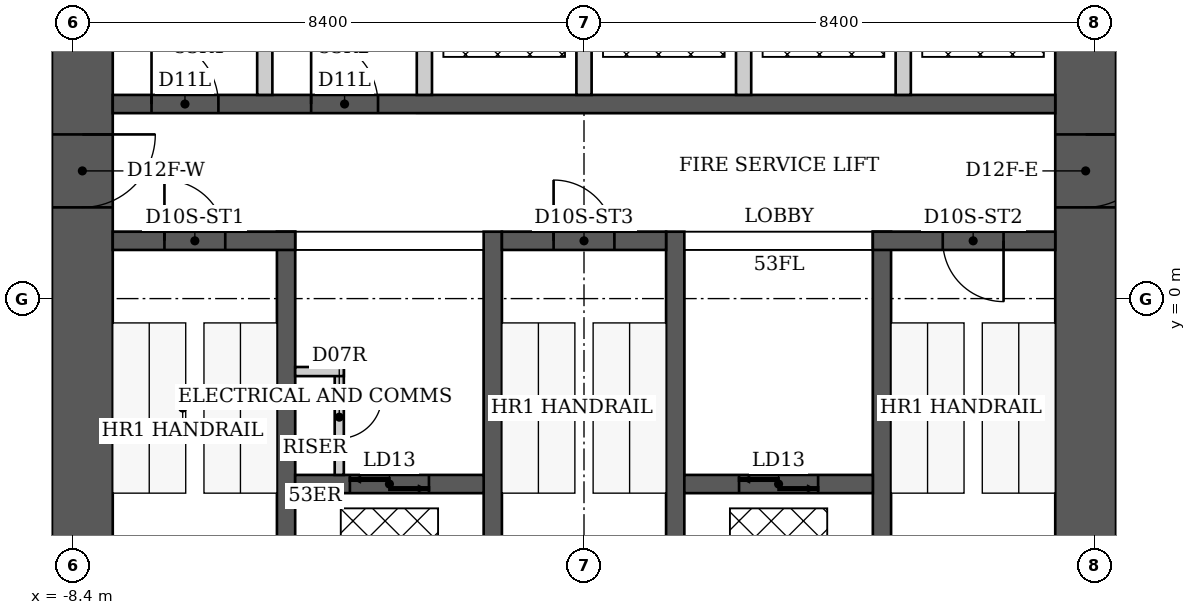
"""IFC4 building model, lengths in metres.
Left out: names, types, materials, properties, quantities, classifications, styles, units other than length and angle.
Written with IfcOpenShell. Run it as: python <this file> out.ifc"""

import sys

from ifc_helpers import new_model, si_unit, direction, frame, frame_2d, origin, place, context, subcontext, project, spatial, rectangle, extrude, element, fill, save


model = new_model("IFC4")
c1 = context("Model", 3, precision=1e-05, world=origin(), true_north=direction((0.0, 1.0)))
c2 = subcontext(c1, "Body", "Model", "MODEL_VIEW")
j1 = project(units=[si_unit("LENGTHUNIT", "METRE"), si_unit("PLANEANGLEUNIT", "RADIAN")], contexts=[c1])
p1 = place(None, origin())
s1 = spatial("IfcSite", under=j1, at=p1, CompositionType="ELEMENT")
p2 = place(p1, origin())
s2 = spatial("IfcBuilding", under=s1, at=p2, CompositionType="ELEMENT")
p3 = place(p2, frame((0.0, 0.0, 213.6)))
s3 = spatial("IfcBuildingStorey", under=s2, at=p3, CompositionType="ELEMENT", Elevation=213.6)
p4 = place(p3, frame((-8.25, -6.1, 0.0), z_axis=(0.0, 0.0, 1.0), x_axis=(0.0, 1.0, 0.0)))
e1 = element("IfcWall", 1, at=p4, inside=s3, PredefinedType="SHEAR", context=c2, shape_type="SweptSolid", body=[
    extrude(rectangle(XDim=12.2, YDim=1.0, at=frame_2d((6.1, 0.0))), origin(), (0.0, 0.0, 1.0), 3.8),
])
p5 = place(p4, frame((7.6, 0.0, 0.0)))
e2 = element("IfcOpeningElement", 2, at=p5, cuts=e1, PredefinedType="OPENING", context=c2, shape_type="SweptSolid", body=[
    extrude(rectangle(XDim=1.2, YDim=2.2, at=frame_2d((0.6, 1.1))), frame((0.0, 0.5, 0.0), z_axis=(0.0, -1.0, 0.0), x_axis=(1.0, 0.0, 0.0)), (0.0, 0.0, 1.0), 1.0),
])
p6 = place(p3, frame((8.25, -6.1, 0.0), z_axis=(0.0, 0.0, 1.0), x_axis=(0.0, 1.0, 0.0)))
e3 = element("IfcWall", 3, at=p6, inside=s3, PredefinedType="SHEAR", context=c2, shape_type="SweptSolid", body=[
    extrude(rectangle(XDim=12.2, YDim=1.0, at=frame_2d((6.1, 0.0))), origin(), (0.0, 0.0, 1.0), 3.8),
])
p7 = place(p6, frame((7.6, 0.0, 0.0)))
e4 = element("IfcOpeningElement", 4, at=p7, cuts=e3, PredefinedType="OPENING", context=c2, shape_type="SweptSolid", body=[
    extrude(rectangle(XDim=1.2, YDim=2.2, at=frame_2d((0.6, 1.1))), frame((0.0, 0.5, 0.0), z_axis=(0.0, -1.0, 0.0), x_axis=(1.0, 0.0, 0.0)), (0.0, 0.0, 1.0), 1.0),
])
for number, where, z_axis, x_axis in (
    (5, (-4.9, -6.1, 0.0), (0.0, 0.0, 1.0), (0.0, 1.0, 0.0)),
    (6, (-1.5, -6.1, 0.0), (0.0, 0.0, 1.0), (0.0, 1.0, 0.0)),
    (7, (1.5, -6.1, 0.0), (0.0, 0.0, 1.0), (0.0, 1.0, 0.0)),
    (8, (4.9, -6.1, 0.0), (0.0, 0.0, 1.0), (0.0, 1.0, 0.0)),
):
    element("IfcWall", number, at=place(p3, frame(where, z_axis=z_axis, x_axis=x_axis)), inside=s3, PredefinedType="SHEAR", context=c2, shape_type="SweptSolid", body=[
        extrude(rectangle(XDim=7.2, YDim=0.3, at=frame_2d((3.6, 0.0))), origin(), (0.0, 0.0, 1.0), 3.8),
    ])
p8 = place(p3, frame((-7.75, 0.95, 0.0), z_axis=(0.0, 0.0, 1.0), x_axis=(1.0, 0.0, 0.0)))
e9 = element("IfcWall", 9, at=p8, inside=s3, PredefinedType="SHEAR", context=c2, shape_type="SweptSolid", body=[
    extrude(rectangle(XDim=3.0, YDim=0.3, at=frame_2d((1.5, 0.0))), origin(), (0.0, 0.0, 1.0), 3.8),
])
p9 = place(p8, frame((0.85, 0.0, 0.0)))
e10 = element("IfcOpeningElement", 10, at=p9, cuts=e9, PredefinedType="OPENING", context=c2, shape_type="SweptSolid", body=[
    extrude(rectangle(XDim=1.0, YDim=2.2, at=frame_2d((0.5, 1.1))), frame((0.0, 0.15, 0.0), z_axis=(0.0, -1.0, 0.0), x_axis=(1.0, 0.0, 0.0)), (0.0, 0.0, 1.0), 0.3),
])
p10 = place(p3, frame((-1.35, 0.95, 0.0), z_axis=(0.0, 0.0, 1.0), x_axis=(1.0, 0.0, 0.0)))
e11 = element("IfcWall", 11, at=p10, inside=s3, PredefinedType="SHEAR", context=c2, shape_type="SweptSolid", body=[
    extrude(rectangle(XDim=2.7, YDim=0.3, at=frame_2d((1.35, 0.0))), origin(), (0.0, 0.0, 1.0), 3.8),
])
p11 = place(p10, frame((0.85, 0.0, 0.0)))
e12 = element("IfcOpeningElement", 12, at=p11, cuts=e11, PredefinedType="OPENING", context=c2, shape_type="SweptSolid", body=[
    extrude(rectangle(XDim=1.0, YDim=2.2, at=frame_2d((0.5, 1.1))), frame((0.0, 0.15, 0.0), z_axis=(0.0, -1.0, 0.0), x_axis=(1.0, 0.0, 0.0)), (0.0, 0.0, 1.0), 0.3),
])
p12 = place(p3, frame((4.75, 0.95, 0.0), z_axis=(0.0, 0.0, 1.0), x_axis=(1.0, 0.0, 0.0)))
e13 = element("IfcWall", 13, at=p12, inside=s3, PredefinedType="SHEAR", context=c2, shape_type="SweptSolid", body=[
    extrude(rectangle(XDim=3.0, YDim=0.3, at=frame_2d((1.5, 0.0))), origin(), (0.0, 0.0, 1.0), 3.8),
])
p13 = place(p12, frame((1.15, 0.0, 0.0)))
e14 = element("IfcOpeningElement", 14, at=p13, cuts=e13, PredefinedType="OPENING", context=c2, shape_type="SweptSolid", body=[
    extrude(rectangle(XDim=1.0, YDim=2.2, at=frame_2d((0.5, 1.1))), frame((0.0, 0.15, 0.0), z_axis=(0.0, -1.0, 0.0), x_axis=(1.0, 0.0, 0.0)), (0.0, 0.0, 1.0), 0.3),
])
p14 = place(p3, frame((-4.75, -3.05, 0.0), z_axis=(0.0, 0.0, 1.0), x_axis=(1.0, 0.0, 0.0)))
e15 = element("IfcWall", 15, at=p14, inside=s3, PredefinedType="SHEAR", context=c2, shape_type="SweptSolid", body=[
    extrude(rectangle(XDim=3.1, YDim=0.3, at=frame_2d((1.55, 0.0))), origin(), (0.0, 0.0, 1.0), 3.8),
])
p15 = place(p14, frame((0.9, 0.0, 0.0)))
e16 = element("IfcOpeningElement", 16, at=p15, cuts=e15, PredefinedType="OPENING", context=c2, shape_type="SweptSolid", body=[
    extrude(rectangle(XDim=1.3, YDim=2.1, at=frame_2d((0.65, 1.05))), frame((0.0, 0.15, 0.0), z_axis=(0.0, -1.0, 0.0), x_axis=(1.0, 0.0, 0.0)), (0.0, 0.0, 1.0), 0.3),
])
p16 = place(p3, frame((1.65, -3.05, 0.0), z_axis=(0.0, 0.0, 1.0), x_axis=(1.0, 0.0, 0.0)))
e17 = element("IfcWall", 17, at=p16, inside=s3, PredefinedType="SHEAR", context=c2, shape_type="SweptSolid", body=[
    extrude(rectangle(XDim=3.1, YDim=0.3, at=frame_2d((1.55, 0.0))), origin(), (0.0, 0.0, 1.0), 3.8),
])
p17 = place(p16, frame((0.9, 0.0, 0.0)))
e18 = element("IfcOpeningElement", 18, at=p17, cuts=e17, PredefinedType="OPENING", context=c2, shape_type="SweptSolid", body=[
    extrude(rectangle(XDim=1.3, YDim=2.1, at=frame_2d((0.65, 1.05))), frame((0.0, 0.15, 0.0), z_axis=(0.0, -1.0, 0.0), x_axis=(1.0, 0.0, 0.0)), (0.0, 0.0, 1.0), 0.3),
])
p18 = place(p3, frame((-7.75, 3.2, 0.0), z_axis=(0.0, 0.0, 1.0), x_axis=(1.0, 0.0, 0.0)))
e19 = element("IfcWall", 19, at=p18, inside=s3, PredefinedType="SHEAR", context=c2, shape_type="SweptSolid", body=[
    extrude(rectangle(XDim=15.5, YDim=0.3, at=frame_2d((7.75, 0.0))), origin(), (0.0, 0.0, 1.0), 3.8),
])
p19 = place(p18, frame((0.637, 0.0, 0.0)))
e20 = element("IfcOpeningElement", 20, at=p19, cuts=e19, PredefinedType="OPENING", context=c2, shape_type="SweptSolid", body=[
    extrude(rectangle(XDim=1.1, YDim=2.2, at=frame_2d((0.55, 1.1))), frame((0.0, 0.15, 0.0), z_axis=(0.0, -1.0, 0.0), x_axis=(1.0, 0.0, 0.0)), (0.0, 0.0, 1.0), 0.3),
])
p20 = place(p18, frame((3.262, 0.0, 0.0)))
e21 = element("IfcOpeningElement", 21, at=p20, cuts=e19, PredefinedType="OPENING", context=c2, shape_type="SweptSolid", body=[
    extrude(rectangle(XDim=1.1, YDim=2.2, at=frame_2d((0.55, 1.1))), frame((0.0, 0.15, 0.0), z_axis=(0.0, -1.0, 0.0), x_axis=(1.0, 0.0, 0.0)), (0.0, 0.0, 1.0), 0.3),
])
for number, where, z_axis, x_axis in (
    (22, (-5.25, 3.35, 0.0), (0.0, 0.0, 1.0), (0.0, 1.0, 0.0)),
    (23, (-2.625, 3.35, 0.0), (0.0, 0.0, 1.0), (0.0, 1.0, 0.0)),
    (24, (0.0, 3.35, 0.0), (0.0, 0.0, 1.0), (0.0, 1.0, 0.0)),
    (25, (2.625, 3.35, 0.0), (0.0, 0.0, 1.0), (0.0, 1.0, 0.0)),
    (26, (5.25, 3.35, 0.0), (0.0, 0.0, 1.0), (0.0, 1.0, 0.0)),
):
    element("IfcWall", number, at=place(p3, frame(where, z_axis=z_axis, x_axis=x_axis)), inside=s3, PredefinedType="PARTITIONING", context=c2, shape_type="SweptSolid", body=[
        extrude(rectangle(XDim=2.75, YDim=0.25, at=frame_2d((1.375, 0.0))), origin(), (0.0, 0.0, 1.0), 3.8),
    ])
p21 = place(p3, frame((-12.66, -3.39, 0.0), z_axis=(0.0, 0.0, 1.0), x_axis=(0.499511590934, -0.866307203319, 0.0)))
e27 = element("IfcWall", 27, at=p21, inside=s3, PredefinedType="PARTITIONING", context=c2, shape_type="SweptSolid", body=[
    extrude(rectangle(XDim=9.189, YDim=0.2, at=frame_2d((4.594, 0.0))), origin(), (0.0, 0.0, 1.0), 3.64),
])
p22 = place(p21, frame((4.094, 0.0, 0.0)))
e28 = element("IfcOpeningElement", 28, at=p22, cuts=e27, PredefinedType="OPENING", context=c2, shape_type="SweptSolid", body=[
    extrude(rectangle(XDim=1.0, YDim=2.13, at=frame_2d((0.5, 1.065))), frame((0.0, 0.1, 0.0), z_axis=(0.0, -1.0, 0.0), x_axis=(1.0, 0.0, 0.0)), (0.0, 0.0, 1.0), 0.2),
])
p23 = place(p3, frame((-4.025, -2.9, 0.0), z_axis=(0.0, 0.0, 1.0), x_axis=(0.0, 1.0, 0.0)))
e29 = element("IfcWall", 29, at=p23, inside=s3, PredefinedType="PARTITIONING", context=c2, shape_type="SweptSolid", body=[
    extrude(rectangle(XDim=1.775, YDim=0.15, at=frame_2d((0.887, 0.0))), origin(), (0.0, 0.0, 1.0), 3.64),
])
p24 = place(p23, frame((0.6, 0.0, 0.0)))
e30 = element("IfcOpeningElement", 30, at=p24, cuts=e29, PredefinedType="OPENING", context=c2, shape_type="SweptSolid", body=[
    extrude(rectangle(XDim=0.7, YDim=2.1, at=frame_2d((0.35, 1.05))), frame((0.0, 0.075, 0.0), z_axis=(0.0, -1.0, 0.0), x_axis=(1.0, 0.0, 0.0)), (0.0, 0.0, 1.0), 0.15),
])
p25 = place(p3, frame((-4.75, -1.2, 0.0), z_axis=(0.0, 0.0, 1.0), x_axis=(1.0, 0.0, 0.0)))
e31 = element("IfcWall", 31, at=p25, inside=s3, PredefinedType="PARTITIONING", context=c2, shape_type="SweptSolid", body=[
    extrude(rectangle(XDim=0.8, YDim=0.15, at=frame_2d((0.4, 0.0))), origin(), (0.0, 0.0, 1.0), 3.64),
])
p26 = place(p9, origin())
e32 = element("IfcDoor", 32, at=p26, inside=s3, OperationType="SINGLE_SWING_LEFT", PredefinedType="DOOR", context=c2, shape_type="SweptSolid", body=[
    extrude(rectangle(XDim=1.0, YDim=2.2, at=frame_2d((0.5, 1.1))), frame((0.0, 0.025, 0.0), z_axis=(0.0, -1.0, 0.0), x_axis=(1.0, 0.0, 0.0)), (0.0, 0.0, 1.0), 0.05),
])
fill(e10, e32)
p27 = place(p11, origin())
e33 = element("IfcDoor", 33, at=p27, inside=s3, OperationType="SINGLE_SWING_LEFT", PredefinedType="DOOR", context=c2, shape_type="SweptSolid", body=[
    extrude(rectangle(XDim=1.0, YDim=2.2, at=frame_2d((0.5, 1.1))), frame((0.0, 0.025, 0.0), z_axis=(0.0, -1.0, 0.0), x_axis=(1.0, 0.0, 0.0)), (0.0, 0.0, 1.0), 0.05),
])
fill(e12, e33)
p28 = place(p13, origin())
e34 = element("IfcDoor", 34, at=p28, inside=s3, OperationType="SINGLE_SWING_RIGHT", PredefinedType="DOOR", context=c2, shape_type="SweptSolid", body=[
    extrude(rectangle(XDim=1.0, YDim=2.2, at=frame_2d((0.5, 1.1))), frame((0.0, 0.025, 0.0), z_axis=(0.0, -1.0, 0.0), x_axis=(1.0, 0.0, 0.0)), (0.0, 0.0, 1.0), 0.05),
])
fill(e14, e34)
p29 = place(p5, origin())
e35 = element("IfcDoor", 35, at=p29, inside=s3, OperationType="SINGLE_SWING_RIGHT", PredefinedType="DOOR", context=c2, shape_type="SweptSolid", body=[
    extrude(rectangle(XDim=1.2, YDim=2.2, at=frame_2d((0.6, 1.1))), frame((0.0, 0.025, 0.0), z_axis=(0.0, -1.0, 0.0), x_axis=(1.0, 0.0, 0.0)), (0.0, 0.0, 1.0), 0.05),
])
fill(e2, e35)
p30 = place(p7, origin())
e36 = element("IfcDoor", 36, at=p30, inside=s3, OperationType="SINGLE_SWING_RIGHT", PredefinedType="DOOR", context=c2, shape_type="SweptSolid", body=[
    extrude(rectangle(XDim=1.2, YDim=2.2, at=frame_2d((0.6, 1.1))), frame((0.0, 0.025, 0.0), z_axis=(0.0, -1.0, 0.0), x_axis=(1.0, 0.0, 0.0)), (0.0, 0.0, 1.0), 0.05),
])
fill(e4, e36)
p31 = place(p24, origin())
e37 = element("IfcDoor", 37, at=p31, inside=s3, OperationType="SINGLE_SWING_RIGHT", PredefinedType="DOOR", context=c2, shape_type="SweptSolid", body=[
    extrude(rectangle(XDim=0.7, YDim=2.1, at=frame_2d((0.35, 1.05))), frame((0.0, 0.025, 0.0), z_axis=(0.0, -1.0, 0.0), x_axis=(1.0, 0.0, 0.0)), (0.0, 0.0, 1.0), 0.05),
])
fill(e30, e37)
p32 = place(p19, origin())
e38 = element("IfcDoor", 38, at=p32, inside=s3, OperationType="SINGLE_SWING_LEFT", PredefinedType="DOOR", context=c2, shape_type="SweptSolid", body=[
    extrude(rectangle(XDim=1.1, YDim=2.2, at=frame_2d((0.55, 1.1))), frame((0.0, 0.025, 0.0), z_axis=(0.0, -1.0, 0.0), x_axis=(1.0, 0.0, 0.0)), (0.0, 0.0, 1.0), 0.05),
])
fill(e20, e38)
p33 = place(p20, origin())
e39 = element("IfcDoor", 39, at=p33, inside=s3, OperationType="SINGLE_SWING_LEFT", PredefinedType="DOOR", context=c2, shape_type="SweptSolid", body=[
    extrude(rectangle(XDim=1.1, YDim=2.2, at=frame_2d((0.55, 1.1))), frame((0.0, 0.025, 0.0), z_axis=(0.0, -1.0, 0.0), x_axis=(1.0, 0.0, 0.0)), (0.0, 0.0, 1.0), 0.05),
])
fill(e21, e39)
p34 = place(p15, origin())
e40 = element("IfcDoor", 40, at=p34, inside=s3, OperationType="DOUBLE_DOOR_SLIDING", PredefinedType="DOOR", context=c2, shape_type="SweptSolid", body=[
    extrude(rectangle(XDim=1.3, YDim=2.1, at=frame_2d((0.65, 1.05))), frame((0.0, 0.025, 0.0), z_axis=(0.0, -1.0, 0.0), x_axis=(1.0, 0.0, 0.0)), (0.0, 0.0, 1.0), 0.05),
])
fill(e16, e40)
p35 = place(p17, origin())
e41 = element("IfcDoor", 41, at=p35, inside=s3, OperationType="DOUBLE_DOOR_SLIDING", PredefinedType="DOOR", context=c2, shape_type="SweptSolid", body=[
    extrude(rectangle(XDim=1.3, YDim=2.1, at=frame_2d((0.65, 1.05))), frame((0.0, 0.025, 0.0), z_axis=(0.0, -1.0, 0.0), x_axis=(1.0, 0.0, 0.0)), (0.0, 0.0, 1.0), 0.05),
])
fill(e18, e41)
save(model, sys.argv[1])
